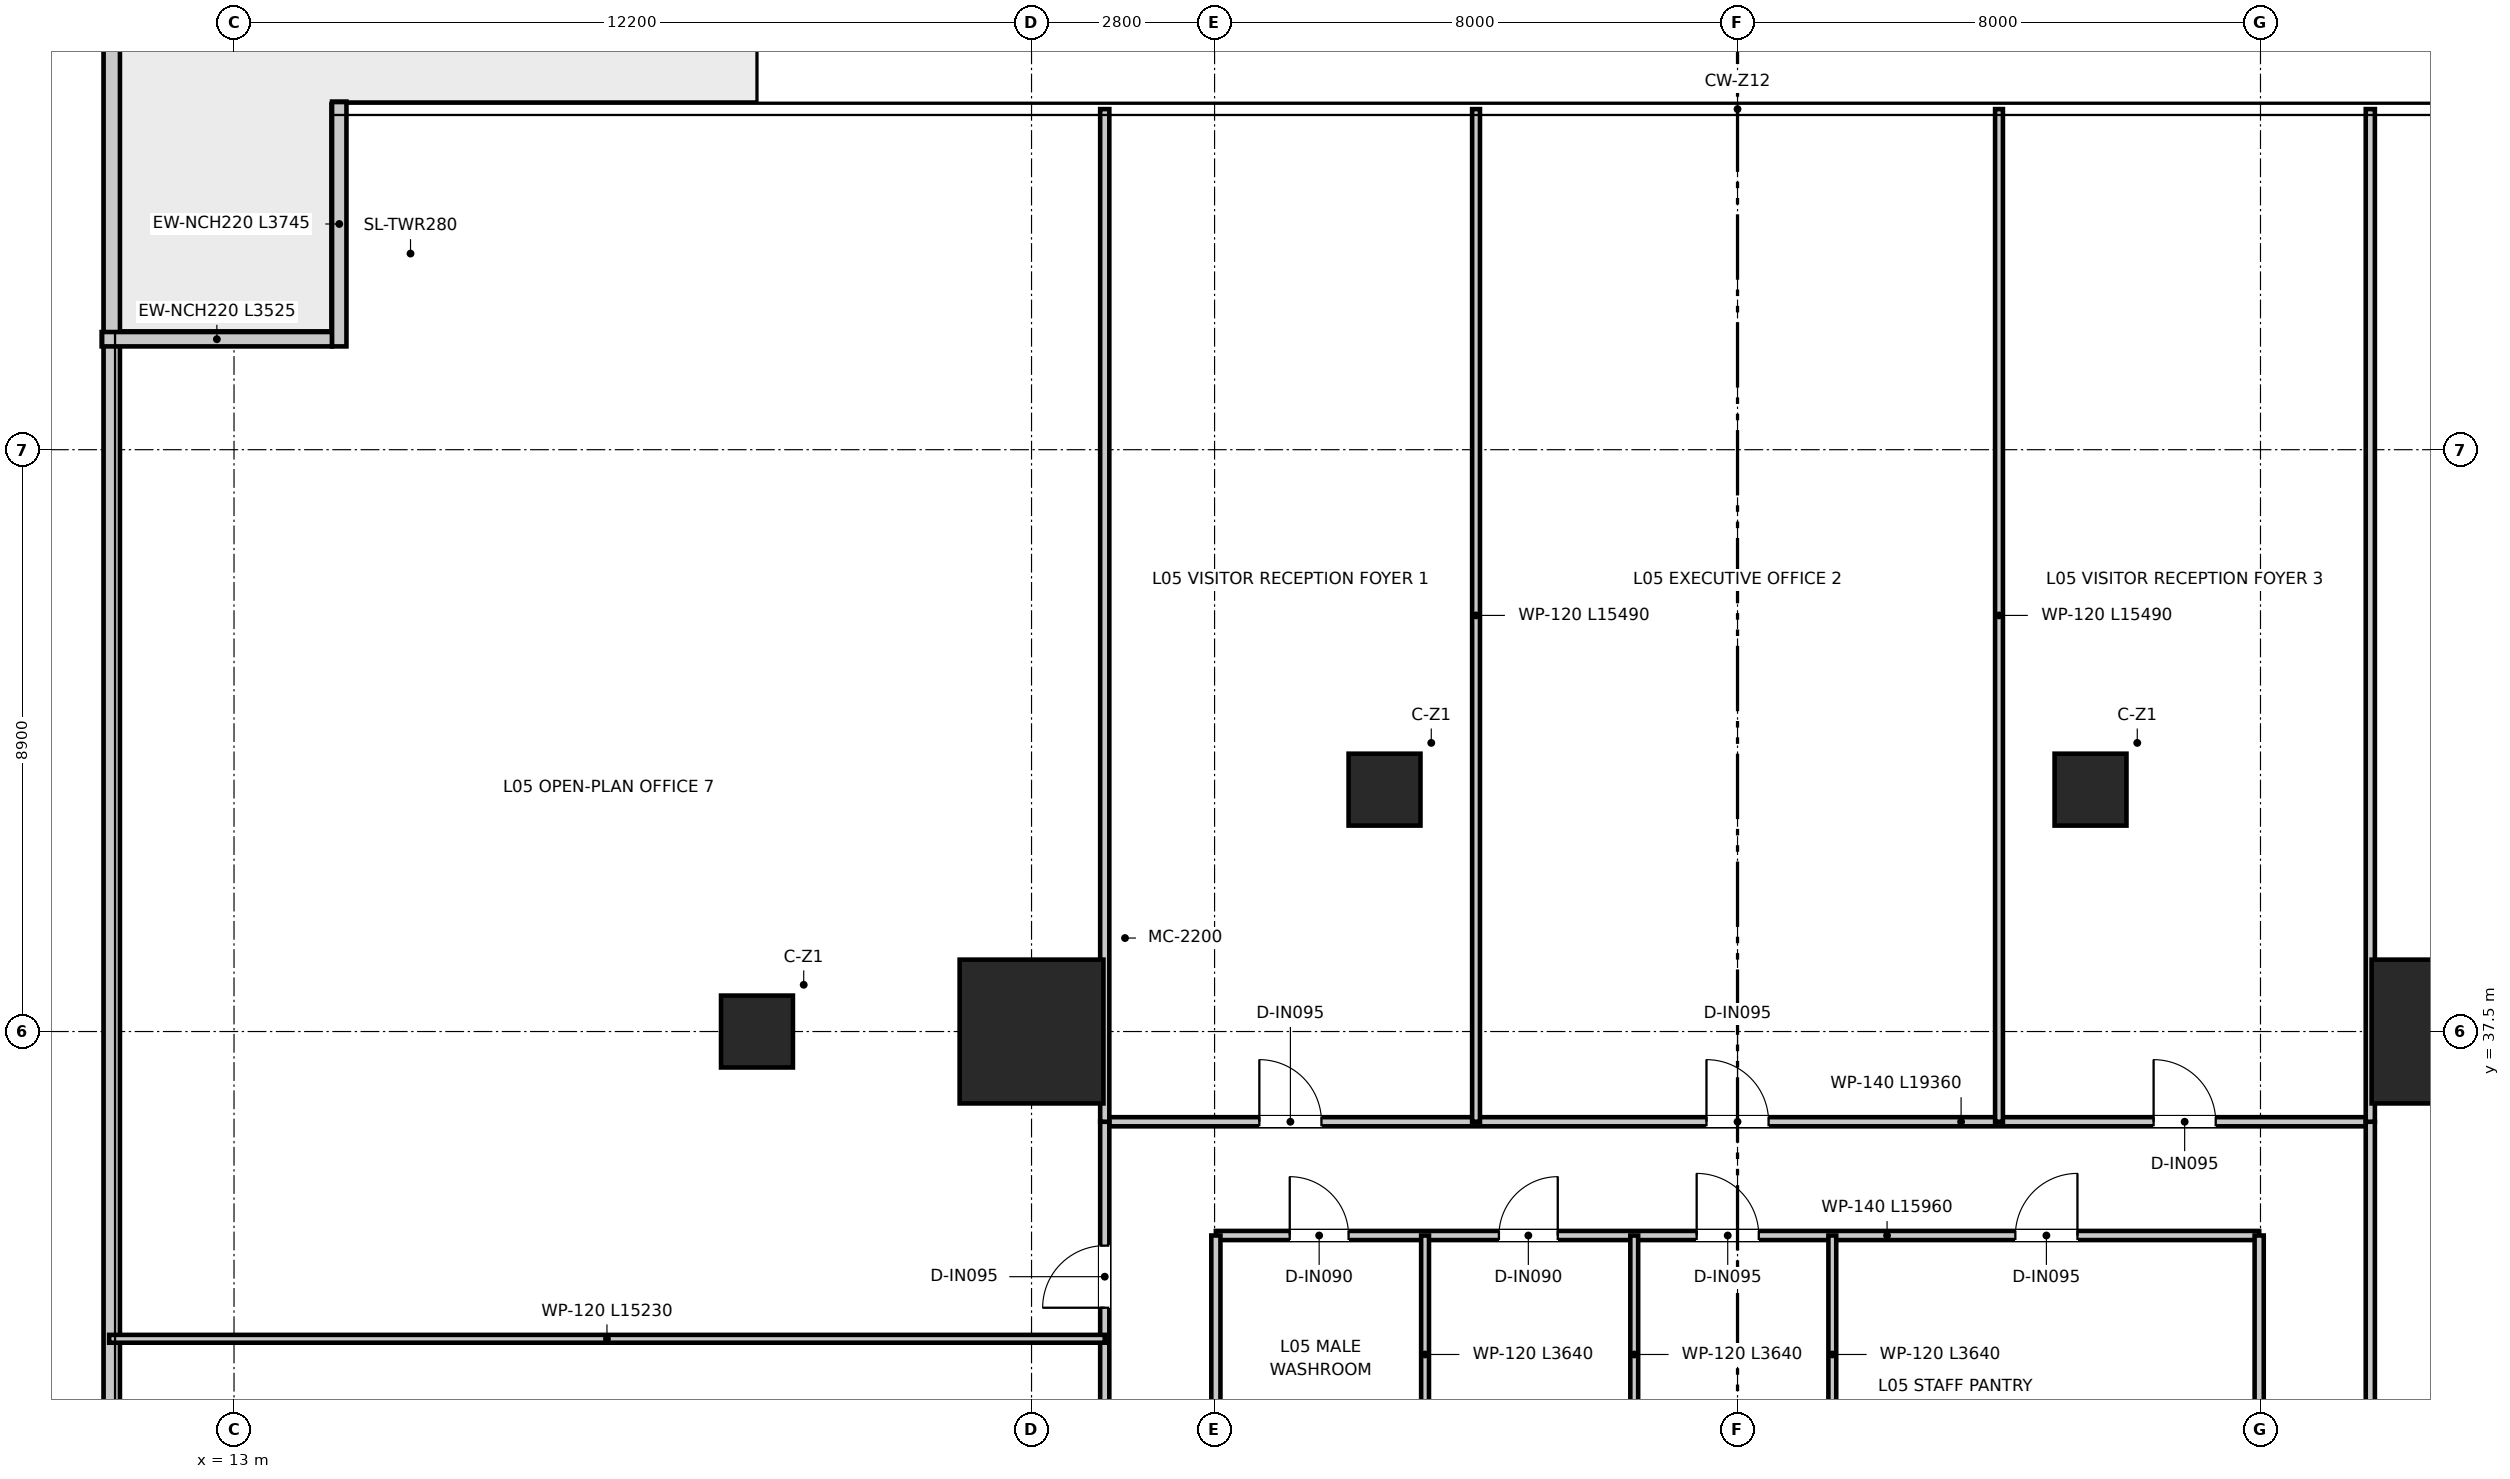
"""IFC4 building model, lengths in metres.
Left out: names, types, materials, properties, quantities, classifications, styles, units other than length and angle.
Written with IfcOpenShell. Run it as: python <this file> out.ifc"""

import sys

from ifc_helpers import new_model, si_unit, direction, frame, frame_2d, origin, origin_2d, place, context, subcontext, project, spatial, rectangle, extrude, source, transform, mapped, element, fill, save


model = new_model("IFC4")
c1 = context("Model", 3, precision=1e-05, world=origin(), true_north=direction((0.0, 1.0)))
c2 = subcontext(c1, "Body", "Model", "MODEL_VIEW")
j1 = project(units=[si_unit("LENGTHUNIT", "METRE"), si_unit("PLANEANGLEUNIT", "RADIAN")], contexts=[c1])
p1 = place(None, origin())
s1 = spatial("IfcSite", under=j1, at=p1, CompositionType="ELEMENT")
p2 = place(p1, origin())
s2 = spatial("IfcBuilding", under=s1, at=p2, CompositionType="ELEMENT")
p3 = place(p2, frame((0.0, 0.0, 25.0)))
s3 = spatial("IfcBuildingStorey", under=s2, at=p3, CompositionType="ELEMENT", Elevation=25.0)
m1 = source(origin(), c2, "Body", "SweptSolid", [
    extrude(rectangle(XDim=2.2, YDim=2.2, at=origin_2d()), origin(), (0.0, 0.0, 1.0), 3.95),
])
for number, where, z_axis, x_axis in (
    (1, (46.8, 37.5, 0.0), (0.0, 0.0, 1.0), (1.0, 0.0, 0.0)),
    (2, (25.2, 37.5, 0.0), (0.0, 0.0, 1.0), (1.0, 0.0, 0.0)),
):
    element("IfcColumn", number, at=place(p3, frame(where, z_axis=z_axis, x_axis=x_axis)), inside=s3, PredefinedType="USERDEFINED", context=c2, shape_type="MappedRepresentation", body=[
        mapped(m1, transform((0.0, 0.0, 0.0), x_axis=(1.0, 0.0, 0.0), y_axis=(0.0, 1.0, 0.0), z_axis=(0.0, 0.0, 1.0), scale=1.0)),
    ])
m2 = source(origin(), c2, "Body", "SweptSolid", [
    extrude(rectangle(XDim=1.1, YDim=1.1, at=origin_2d()), origin(), (0.0, 0.0, 1.0), 3.95),
])
for number, where, z_axis, x_axis in (
    (3, (21.0, 37.5, 0.0), (0.0, 0.0, 1.0), (1.0, 0.0, 0.0)),
    (4, (30.6, 41.2, 0.0), (0.0, 0.0, 1.0), (1.0, 0.0, 0.0)),
    (5, (41.4, 41.2, 0.0), (0.0, 0.0, 1.0), (1.0, 0.0, 0.0)),
):
    element("IfcColumn", number, at=place(p3, frame(where, z_axis=z_axis, x_axis=x_axis)), inside=s3, PredefinedType="COLUMN", context=c2, shape_type="MappedRepresentation", body=[
        mapped(m2, transform((0.0, 0.0, 0.0), x_axis=(1.0, 0.0, 0.0), y_axis=(0.0, 1.0, 0.0), z_axis=(0.0, 0.0, 1.0), scale=1.0)),
    ])
p4 = place(p3, frame((11.13, 0.45, 0.0), z_axis=(0.0, 0.0, 1.0), x_axis=(0.0, 1.0, 0.0)))
e6 = element("IfcWall", 6, at=p4, inside=s3, PredefinedType="PARAPET", context=c2, shape_type="SweptSolid", body=[
    extrude(rectangle(XDim=52.5, YDim=0.25, at=frame_2d((26.25, 0.0))), origin(), (0.0, 0.0, 1.0), 1.2),
])
p5 = place(p3, frame((14.5, 48.09, 0.0), z_axis=(0.0, 0.0, 1.0), x_axis=(-1.0, 0.0, 0.0)))
e7 = element("IfcWall", 7, at=p5, inside=s3, PredefinedType="ELEMENTEDWALL", context=c2, shape_type="SweptSolid", body=[
    extrude(rectangle(XDim=3.525, YDim=0.22, at=frame_2d((1.762, 0.0))), origin(), (0.0, 0.0, 1.0), 3.67),
])
p6 = place(p3, frame((14.61, 51.725, 0.0), z_axis=(0.0, 0.0, 1.0), x_axis=(0.0, -1.0, 0.0)))
e8 = element("IfcWall", 8, at=p6, inside=s3, PredefinedType="ELEMENTEDWALL", context=c2, shape_type="SweptSolid", body=[
    extrude(rectangle(XDim=3.745, YDim=0.22, at=frame_2d((1.873, 0.0))), origin(), (0.0, 0.0, 1.0), 3.67),
])
p7 = place(p3, frame((28.02, 34.38, 0.0), z_axis=(0.0, 0.0, 1.0), x_axis=(1.0, 0.0, 0.0)))
e9 = element("IfcWall", 9, at=p7, inside=s3, PredefinedType="PARTITIONING", context=c2, shape_type="SweptSolid", body=[
    extrude(rectangle(XDim=15.96, YDim=0.14, at=frame_2d((7.98, 0.0))), origin(), (0.0, 0.0, 1.0), 3.08),
])
p8 = place(p7, frame((1.13, 0.0, 0.0)))
e10 = element("IfcOpeningElement", 10, at=p8, cuts=e9, PredefinedType="OPENING", context=c2, shape_type="SweptSolid", body=[
    extrude(rectangle(XDim=0.9, YDim=2.1, at=frame_2d((0.45, 1.05))), frame((0.0, 0.08, 0.0), z_axis=(0.0, -1.0, 0.0), x_axis=(1.0, 0.0, 0.0)), (0.0, 0.0, 1.0), 0.16),
])
p9 = place(p7, frame((4.33, 0.0, 0.0)))
e11 = element("IfcOpeningElement", 11, at=p9, cuts=e9, PredefinedType="OPENING", context=c2, shape_type="SweptSolid", body=[
    extrude(rectangle(XDim=0.9, YDim=2.1, at=frame_2d((0.45, 1.05))), frame((0.0, 0.08, 0.0), z_axis=(0.0, -1.0, 0.0), x_axis=(1.0, 0.0, 0.0)), (0.0, 0.0, 1.0), 0.16),
])
p10 = place(p7, frame((7.355, 0.0, 0.0)))
e12 = element("IfcOpeningElement", 12, at=p10, cuts=e9, PredefinedType="OPENING", context=c2, shape_type="SweptSolid", body=[
    extrude(rectangle(XDim=0.95, YDim=2.1, at=frame_2d((0.475, 1.05))), frame((0.0, 0.08, 0.0), z_axis=(0.0, -1.0, 0.0), x_axis=(1.0, 0.0, 0.0)), (0.0, 0.0, 1.0), 0.16),
])
p11 = place(p7, frame((12.23, 0.0, 0.0)))
e13 = element("IfcOpeningElement", 13, at=p11, cuts=e9, PredefinedType="OPENING", context=c2, shape_type="SweptSolid", body=[
    extrude(rectangle(XDim=0.95, YDim=2.1, at=frame_2d((0.475, 1.05))), frame((0.0, 0.08, 0.0), z_axis=(0.0, -1.0, 0.0), x_axis=(1.0, 0.0, 0.0)), (0.0, 0.0, 1.0), 0.16),
])
for number, where, z_axis, x_axis in (
    (14, (28.02, 28.64, 0.0), (0.0, 0.0, 1.0), (0.0, 1.0, 0.0)),
    (15, (43.98, 28.64, 0.0), (0.0, 0.0, 1.0), (0.0, 1.0, 0.0)),
):
    element("IfcWall", number, at=place(p3, frame(where, z_axis=z_axis, x_axis=x_axis)), inside=s3, PredefinedType="PARTITIONING", context=c2, shape_type="SweptSolid", body=[
        extrude(rectangle(XDim=5.74, YDim=0.14, at=frame_2d((2.87, 0.0))), origin(), (0.0, 0.0, 1.0), 3.22),
    ])
for number, where, z_axis, x_axis in (
    (16, (31.22, 30.74, 0.0), (0.0, 0.0, 1.0), (0.0, 1.0, 0.0)),
    (17, (34.42, 30.74, 0.0), (0.0, 0.0, 1.0), (0.0, 1.0, 0.0)),
    (18, (37.45, 30.74, 0.0), (0.0, 0.0, 1.0), (0.0, 1.0, 0.0)),
):
    element("IfcWall", number, at=place(p3, frame(where, z_axis=z_axis, x_axis=x_axis)), inside=s3, PredefinedType="PARTITIONING", context=c2, shape_type="SweptSolid", body=[
        extrude(rectangle(XDim=3.64, YDim=0.12, at=frame_2d((1.82, 0.0))), origin(), (0.0, 0.0, 1.0), 3.12),
    ])
p12 = place(p3, frame((26.32, 36.12, 0.0), z_axis=(0.0, 0.0, 1.0), x_axis=(1.0, 0.0, 0.0)))
e19 = element("IfcWall", 19, at=p12, inside=s3, PredefinedType="PARTITIONING", context=c2, shape_type="SweptSolid", body=[
    extrude(rectangle(XDim=19.36, YDim=0.14, at=frame_2d((9.68, 0.0))), origin(), (0.0, 0.0, 1.0), 3.08),
])
p13 = place(p12, frame((2.365, 0.0, 0.0)))
e20 = element("IfcOpeningElement", 20, at=p13, cuts=e19, PredefinedType="OPENING", context=c2, shape_type="SweptSolid", body=[
    extrude(rectangle(XDim=0.95, YDim=2.1, at=frame_2d((0.475, 1.05))), frame((0.0, 0.08, 0.0), z_axis=(0.0, -1.0, 0.0), x_axis=(1.0, 0.0, 0.0)), (0.0, 0.0, 1.0), 0.16),
])
p14 = place(p12, frame((9.205, 0.0, 0.0)))
e21 = element("IfcOpeningElement", 21, at=p14, cuts=e19, PredefinedType="OPENING", context=c2, shape_type="SweptSolid", body=[
    extrude(rectangle(XDim=0.95, YDim=2.1, at=frame_2d((0.475, 1.05))), frame((0.0, 0.08, 0.0), z_axis=(0.0, -1.0, 0.0), x_axis=(1.0, 0.0, 0.0)), (0.0, 0.0, 1.0), 0.16),
])
p15 = place(p12, frame((16.045, 0.0, 0.0)))
e22 = element("IfcOpeningElement", 22, at=p15, cuts=e19, PredefinedType="OPENING", context=c2, shape_type="SweptSolid", body=[
    extrude(rectangle(XDim=0.95, YDim=2.1, at=frame_2d((0.475, 1.05))), frame((0.0, 0.08, 0.0), z_axis=(0.0, -1.0, 0.0), x_axis=(1.0, 0.0, 0.0)), (0.0, 0.0, 1.0), 0.16),
])
p16 = place(p3, frame((26.32, 10.5, 0.0), z_axis=(0.0, 0.0, 1.0), x_axis=(0.0, 1.0, 0.0)))
e23 = element("IfcWall", 23, at=p16, inside=s3, PredefinedType="PARTITIONING", context=c2, shape_type="SweptSolid", body=[
    extrude(rectangle(XDim=25.62, YDim=0.14, at=frame_2d((12.81, 0.0))), origin(), (0.0, 0.0, 1.0), 2.97),
])
p17 = place(p16, frame((7.775, 0.0, 0.0)))
e24 = element("IfcOpeningElement", 24, at=p17, cuts=e23, PredefinedType="OPENING", context=c2, shape_type="SweptSolid", body=[
    extrude(rectangle(XDim=0.95, YDim=2.1, at=frame_2d((0.475, 1.05))), frame((0.0, 0.08, 0.0), z_axis=(0.0, -1.0, 0.0), x_axis=(1.0, 0.0, 0.0)), (0.0, 0.0, 1.0), 0.16),
])
p18 = place(p16, frame((12.425, 0.0, 0.0)))
e25 = element("IfcOpeningElement", 25, at=p18, cuts=e23, PredefinedType="OPENING", context=c2, shape_type="SweptSolid", body=[
    extrude(rectangle(XDim=0.95, YDim=2.1, at=frame_2d((0.475, 1.05))), frame((0.0, 0.08, 0.0), z_axis=(0.0, -1.0, 0.0), x_axis=(1.0, 0.0, 0.0)), (0.0, 0.0, 1.0), 0.16),
])
p19 = place(p16, frame((18.825, 0.0, 0.0)))
e26 = element("IfcOpeningElement", 26, at=p19, cuts=e23, PredefinedType="OPENING", context=c2, shape_type="SweptSolid", body=[
    extrude(rectangle(XDim=0.95, YDim=2.1, at=frame_2d((0.475, 1.05))), frame((0.0, 0.08, 0.0), z_axis=(0.0, -1.0, 0.0), x_axis=(1.0, 0.0, 0.0)), (0.0, 0.0, 1.0), 0.16),
])
p20 = place(p16, frame((22.775, 0.0, 0.0)))
e27 = element("IfcOpeningElement", 27, at=p20, cuts=e23, PredefinedType="OPENING", context=c2, shape_type="SweptSolid", body=[
    extrude(rectangle(XDim=0.95, YDim=2.1, at=frame_2d((0.475, 1.05))), frame((0.0, 0.08, 0.0), z_axis=(0.0, -1.0, 0.0), x_axis=(1.0, 0.0, 0.0)), (0.0, 0.0, 1.0), 0.16),
])
p21 = place(p3, frame((45.68, 10.5, 0.0), z_axis=(0.0, 0.0, 1.0), x_axis=(0.0, 1.0, 0.0)))
e28 = element("IfcWall", 28, at=p21, inside=s3, PredefinedType="PARTITIONING", context=c2, shape_type="SweptSolid", body=[
    extrude(rectangle(XDim=25.62, YDim=0.14, at=frame_2d((12.81, 0.0))), origin(), (0.0, 0.0, 1.0), 2.97),
])
p22 = place(p21, frame((9.775, 0.0, 0.0)))
e29 = element("IfcOpeningElement", 29, at=p22, cuts=e28, PredefinedType="OPENING", context=c2, shape_type="SweptSolid", body=[
    extrude(rectangle(XDim=0.95, YDim=2.1, at=frame_2d((0.475, 1.05))), frame((0.0, 0.08, 0.0), z_axis=(0.0, -1.0, 0.0), x_axis=(1.0, 0.0, 0.0)), (0.0, 0.0, 1.0), 0.16),
])
p23 = place(p21, frame((18.375, 0.0, 0.0)))
e30 = element("IfcOpeningElement", 30, at=p23, cuts=e28, PredefinedType="OPENING", context=c2, shape_type="SweptSolid", body=[
    extrude(rectangle(XDim=0.95, YDim=2.1, at=frame_2d((0.475, 1.05))), frame((0.0, 0.08, 0.0), z_axis=(0.0, -1.0, 0.0), x_axis=(1.0, 0.0, 0.0)), (0.0, 0.0, 1.0), 0.16),
])
for number, where, z_axis, x_axis in (
    (31, (26.32, 36.12, 0.0), (0.0, 0.0, 1.0), (0.0, 1.0, 0.0)),
    (32, (45.68, 36.12, 0.0), (0.0, 0.0, 1.0), (0.0, 1.0, 0.0)),
):
    element("IfcWall", number, at=place(p3, frame(where, z_axis=z_axis, x_axis=x_axis)), inside=s3, PredefinedType="PARTITIONING", context=c2, shape_type="SweptSolid", body=[
        extrude(rectangle(XDim=15.49, YDim=0.14, at=frame_2d((7.745, 0.0))), origin(), (0.0, 0.0, 1.0), 2.97),
    ])
for number, where, z_axis, x_axis in (
    (33, (32.0, 36.12, 0.0), (0.0, 0.0, 1.0), (0.0, 1.0, 0.0)),
    (34, (40.0, 36.12, 0.0), (0.0, 0.0, 1.0), (0.0, 1.0, 0.0)),
):
    element("IfcWall", number, at=place(p3, frame(where, z_axis=z_axis, x_axis=x_axis)), inside=s3, PredefinedType="PARTITIONING", context=c2, shape_type="SweptSolid", body=[
        extrude(rectangle(XDim=15.49, YDim=0.12, at=frame_2d((7.745, 0.0))), origin(), (0.0, 0.0, 1.0), 2.97),
    ])
p24 = place(p3, frame((11.09, 32.8, 0.0), z_axis=(0.0, 0.0, 1.0), x_axis=(1.0, 0.0, 0.0)))
e35 = element("IfcWall", 35, at=p24, inside=s3, PredefinedType="PARTITIONING", context=c2, shape_type="SweptSolid", body=[
    extrude(rectangle(XDim=15.23, YDim=0.12, at=frame_2d((7.615, 0.0))), origin(), (0.0, 0.0, 1.0), 2.97),
])
p25 = place(p8, origin())
e36 = element("IfcDoor", 36, at=p25, inside=s3, OperationType="SINGLE_SWING_LEFT", PredefinedType="DOOR", context=c2, shape_type="SweptSolid", body=[
    extrude(rectangle(XDim=0.9, YDim=2.1, at=frame_2d((0.45, 1.05))), frame((0.0, 0.025, 0.0), z_axis=(0.0, -1.0, 0.0), x_axis=(1.0, 0.0, 0.0)), (0.0, 0.0, 1.0), 0.05),
])
fill(e10, e36)
p26 = place(p9, origin())
e37 = element("IfcDoor", 37, at=p26, inside=s3, OperationType="SINGLE_SWING_RIGHT", PredefinedType="DOOR", context=c2, shape_type="SweptSolid", body=[
    extrude(rectangle(XDim=0.9, YDim=2.1, at=frame_2d((0.45, 1.05))), frame((0.0, 0.025, 0.0), z_axis=(0.0, -1.0, 0.0), x_axis=(1.0, 0.0, 0.0)), (0.0, 0.0, 1.0), 0.05),
])
fill(e11, e37)
p27 = place(p10, origin())
e38 = element("IfcDoor", 38, at=p27, inside=s3, OperationType="SINGLE_SWING_LEFT", PredefinedType="DOOR", context=c2, shape_type="SweptSolid", body=[
    extrude(rectangle(XDim=0.95, YDim=2.1, at=frame_2d((0.475, 1.05))), frame((0.0, 0.025, 0.0), z_axis=(0.0, -1.0, 0.0), x_axis=(1.0, 0.0, 0.0)), (0.0, 0.0, 1.0), 0.05),
])
fill(e12, e38)
p28 = place(p11, origin())
e39 = element("IfcDoor", 39, at=p28, inside=s3, OperationType="SINGLE_SWING_RIGHT", PredefinedType="DOOR", context=c2, shape_type="SweptSolid", body=[
    extrude(rectangle(XDim=0.95, YDim=2.1, at=frame_2d((0.475, 1.05))), frame((0.0, 0.025, 0.0), z_axis=(0.0, -1.0, 0.0), x_axis=(1.0, 0.0, 0.0)), (0.0, 0.0, 1.0), 0.05),
])
fill(e13, e39)
p29 = place(p13, origin())
e40 = element("IfcDoor", 40, at=p29, inside=s3, OperationType="SINGLE_SWING_LEFT", PredefinedType="DOOR", context=c2, shape_type="SweptSolid", body=[
    extrude(rectangle(XDim=0.95, YDim=2.1, at=frame_2d((0.475, 1.05))), frame((0.0, 0.025, 0.0), z_axis=(0.0, -1.0, 0.0), x_axis=(1.0, 0.0, 0.0)), (0.0, 0.0, 1.0), 0.05),
])
fill(e20, e40)
p30 = place(p14, origin())
e41 = element("IfcDoor", 41, at=p30, inside=s3, OperationType="SINGLE_SWING_LEFT", PredefinedType="DOOR", context=c2, shape_type="SweptSolid", body=[
    extrude(rectangle(XDim=0.95, YDim=2.1, at=frame_2d((0.475, 1.05))), frame((0.0, 0.025, 0.0), z_axis=(0.0, -1.0, 0.0), x_axis=(1.0, 0.0, 0.0)), (0.0, 0.0, 1.0), 0.05),
])
fill(e21, e41)
p31 = place(p15, origin())
e42 = element("IfcDoor", 42, at=p31, inside=s3, OperationType="SINGLE_SWING_LEFT", PredefinedType="DOOR", context=c2, shape_type="SweptSolid", body=[
    extrude(rectangle(XDim=0.95, YDim=2.1, at=frame_2d((0.475, 1.05))), frame((0.0, 0.025, 0.0), z_axis=(0.0, -1.0, 0.0), x_axis=(1.0, 0.0, 0.0)), (0.0, 0.0, 1.0), 0.05),
])
fill(e22, e42)
p32 = place(p20, origin())
e43 = element("IfcDoor", 43, at=p32, inside=s3, OperationType="SINGLE_SWING_LEFT", PredefinedType="DOOR", context=c2, shape_type="SweptSolid", body=[
    extrude(rectangle(XDim=0.95, YDim=2.1, at=frame_2d((0.475, 1.05))), frame((0.0, 0.025, 0.0), z_axis=(0.0, -1.0, 0.0), x_axis=(1.0, 0.0, 0.0)), (0.0, 0.0, 1.0), 0.05),
])
fill(e27, e43)
save(model, sys.argv[1])
